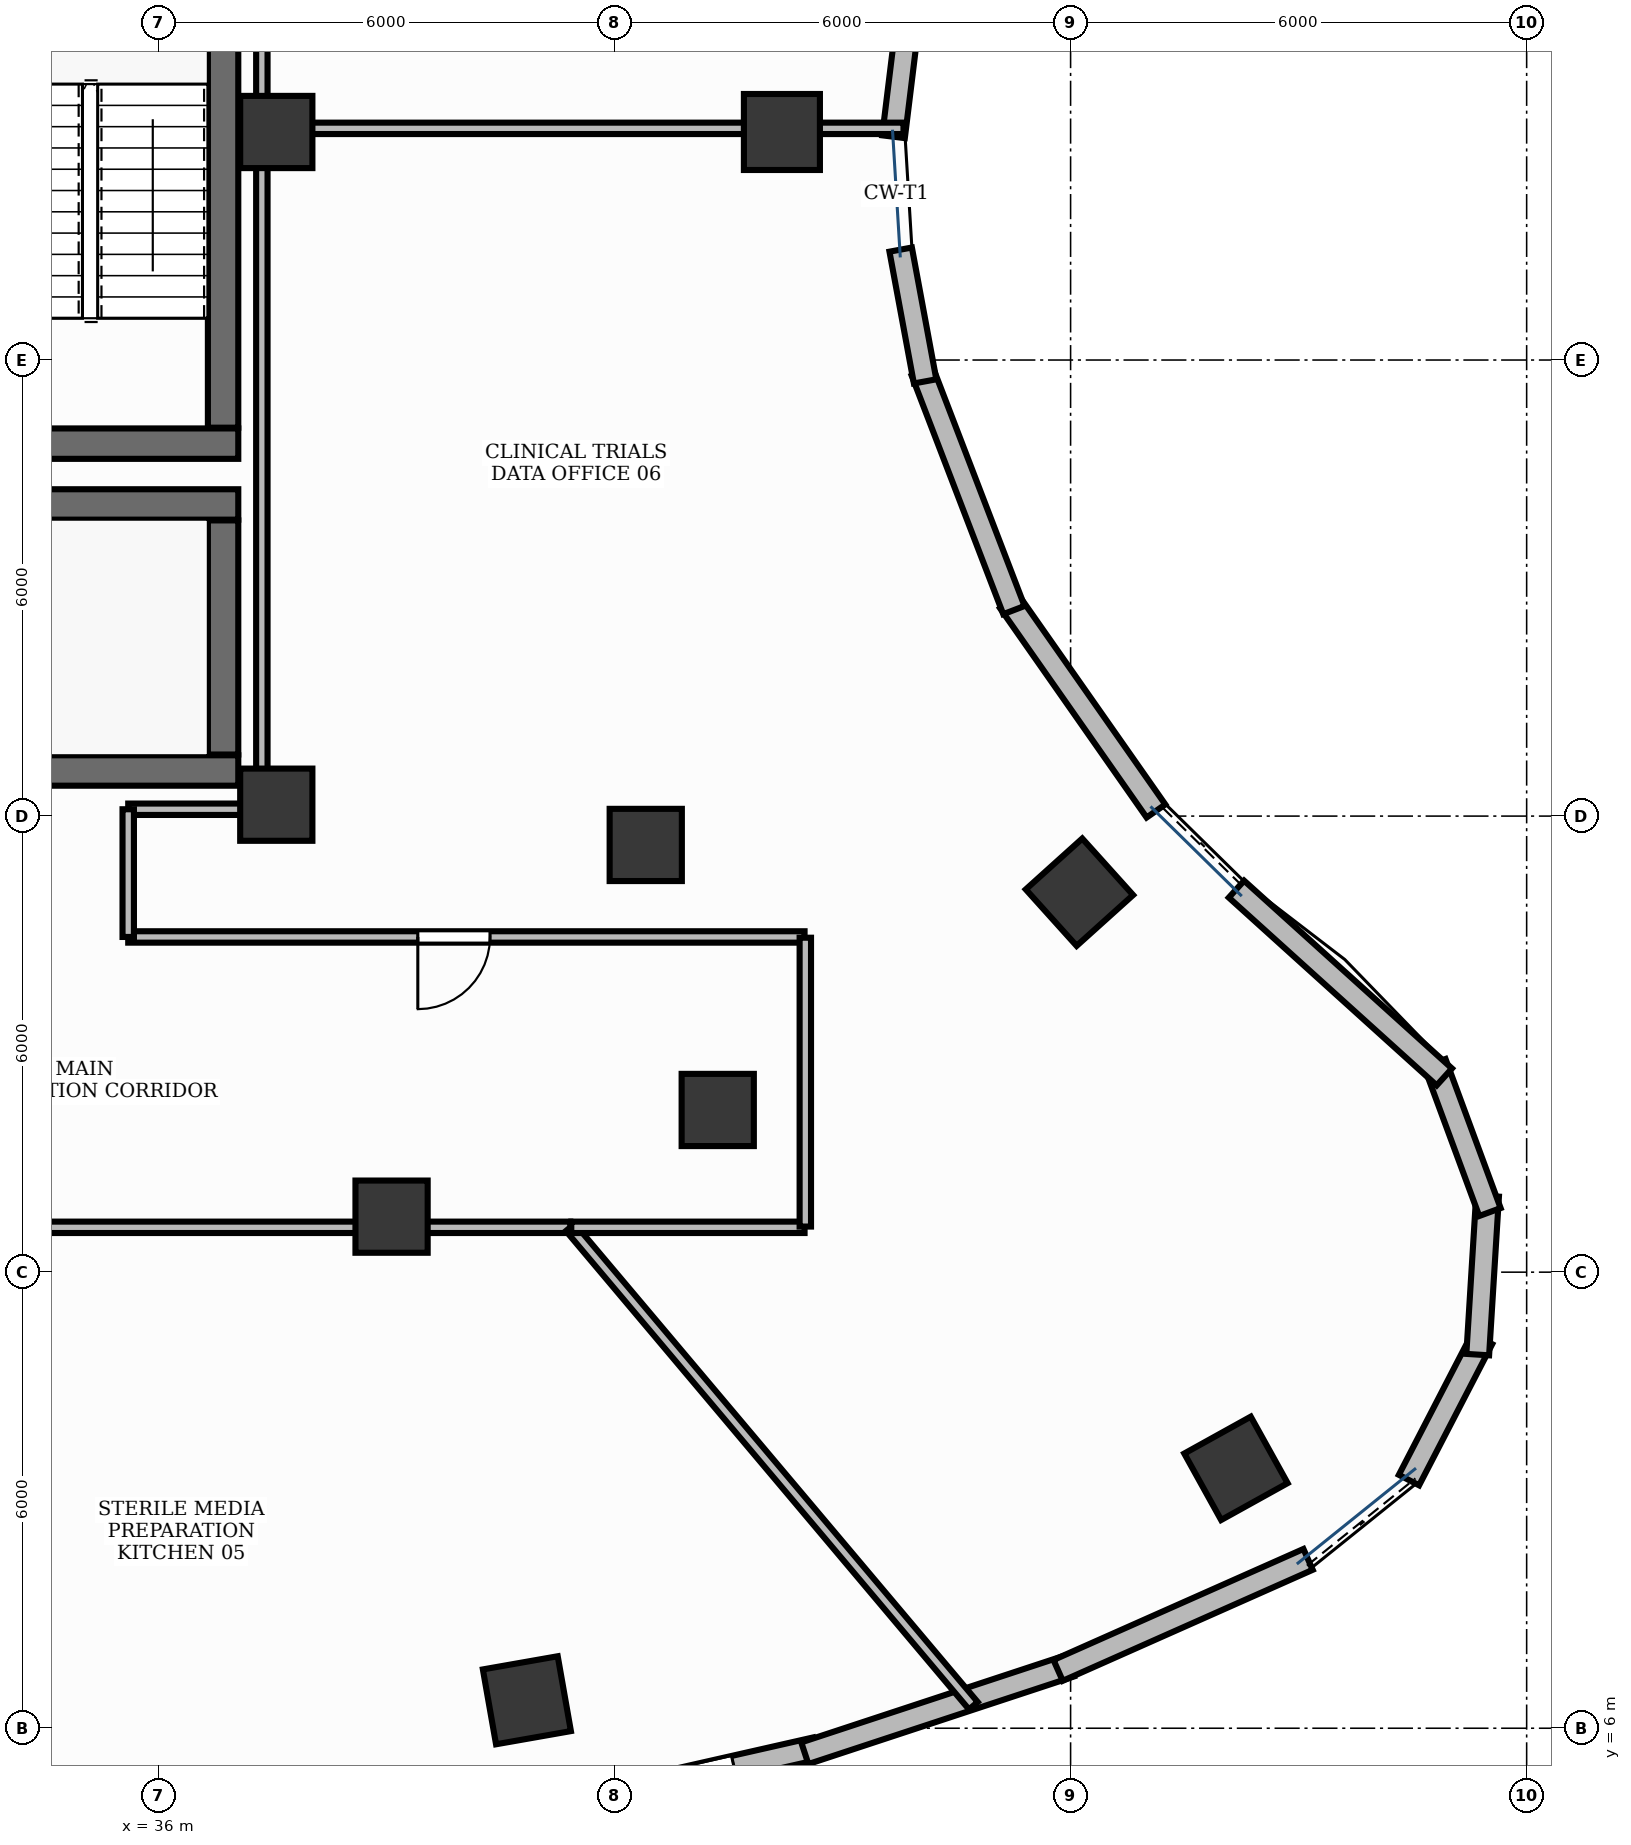
"""IFC4 building model, lengths in metres.
Left out: names, types, materials, properties, quantities, classifications, styles, units other than length and angle.
Written with IfcOpenShell. Run it as: python <this file> out.ifc"""

import sys

from ifc_helpers import new_model, si_unit, direction, frame, frame_2d, origin, origin_2d, place, context, subcontext, project, spatial, rectangle, extrude, element, fill, save


model = new_model("IFC4")
c1 = context("Model", 3, precision=1e-05, world=origin(), true_north=direction((0.0, 1.0)))
c2 = subcontext(c1, "Body", "Model", "MODEL_VIEW")
j1 = project(units=[si_unit("LENGTHUNIT", "METRE"), si_unit("PLANEANGLEUNIT", "RADIAN")], contexts=[c1])
p1 = place(None, origin())
s1 = spatial("IfcSite", under=j1, at=p1, CompositionType="ELEMENT")
p2 = place(p1, origin())
s2 = spatial("IfcBuilding", under=s1, at=p2, CompositionType="ELEMENT")
p3 = place(p2, frame((0.0, 0.0, 218.4)))
s3 = spatial("IfcBuildingStorey", under=s2, at=p3, CompositionType="ELEMENT", Elevation=218.4)
p4 = place(p3, frame((28.852, 18.6, 0.0), z_axis=(0.0, 0.0, 1.0), x_axis=(1.0, 0.0, 0.0)))
e1 = element("IfcWall", 1, at=p4, inside=s3, PredefinedType="SHEAR", context=c2, shape_type="SweptSolid", body=[
    extrude(rectangle(XDim=8.198, YDim=0.4, at=frame_2d((4.099, 0.0))), origin(), (0.0, 0.0, 1.0), 3.9),
])
p5 = place(p3, frame((28.4, 22.1, 0.0), z_axis=(0.0, 0.0, 1.0), x_axis=(1.0, 0.0, 0.0)))
e2 = element("IfcWall", 2, at=p5, inside=s3, PredefinedType="SHEAR", context=c2, shape_type="SweptSolid", body=[
    extrude(rectangle(XDim=8.65, YDim=0.4, at=frame_2d((4.325, 0.0))), origin(), (0.0, 0.0, 1.0), 3.9),
])
p6 = place(p3, frame((36.85, 18.81, 0.0), z_axis=(0.0, 0.0, 1.0), x_axis=(0.0, 1.0, 0.0)))
e3 = element("IfcWall", 3, at=p6, inside=s3, PredefinedType="SHEAR", context=c2, shape_type="SweptSolid", body=[
    extrude(rectangle(XDim=3.08, YDim=0.4, at=frame_2d((1.54, 0.0))), origin(), (0.0, 0.0, 1.0), 3.9),
])
p7 = place(p3, frame((33.15, 22.9, 0.0), z_axis=(0.0, 0.0, 1.0), x_axis=(1.0, 0.0, 0.0)))
e4 = element("IfcWall", 4, at=p7, inside=s3, PredefinedType="SHEAR", context=c2, shape_type="SweptSolid", body=[
    extrude(rectangle(XDim=3.9, YDim=0.4, at=frame_2d((1.95, 0.0))), origin(), (0.0, 0.0, 1.0), 3.9),
])
p8 = place(p3, frame((36.85, 23.11, 0.0), z_axis=(0.0, 0.0, 1.0), x_axis=(0.0, 1.0, 0.0)))
e5 = element("IfcWall", 5, at=p8, inside=s3, PredefinedType="SHEAR", context=c2, shape_type="SweptSolid", body=[
    extrude(rectangle(XDim=7.78, YDim=0.4, at=frame_2d((3.89, 0.0))), origin(), (0.0, 0.0, 1.0), 3.9),
])
for number, where, z_axis, x_axis in (
    (6, (37.55, 18.15, -0.0), (0.0, 0.0, 1.0), (1.0, 0.0, 0.0)),
    (7, (37.55, 27.0, -0.0), (0.0, 0.0, 1.0), (1.0, 0.0, 0.0)),
):
    element("IfcColumn", number, at=place(p3, frame(where, z_axis=z_axis, x_axis=x_axis)), inside=s3, PredefinedType="PILASTER", context=c2, shape_type="SweptSolid", body=[
        extrude(rectangle(XDim=0.95, YDim=0.95, at=origin_2d()), origin(), (0.0, 0.0, 1.0), 3.901),
    ])
p9 = place(p3, frame((40.847, 6.368, -0.0), z_axis=(0.0, 0.0, 1.0), x_axis=(0.984868307662, 0.173304404339, 0.0)))
e8 = element("IfcColumn", 8, at=p9, inside=s3, PredefinedType="COLUMN", context=c2, shape_type="SweptSolid", body=[
    extrude(rectangle(XDim=1.0, YDim=1.0, at=origin_2d()), origin(), (0.0, 0.0, 1.0), 3.901),
])
p10 = place(p3, frame((39.067, 12.73, -0.0), z_axis=(0.0, 0.0, 1.0), x_axis=(1.0, 0.0, 0.0)))
e9 = element("IfcColumn", 9, at=p10, inside=s3, PredefinedType="COLUMN", context=c2, shape_type="SweptSolid", body=[
    extrude(rectangle(XDim=0.95, YDim=0.95, at=origin_2d()), origin(), (0.0, 0.0, 1.0), 3.901),
])
p11 = place(p3, frame((50.176, 9.419, -0.0), z_axis=(0.0, 0.0, 1.0), x_axis=(0.874535078577, 0.484962262797, 0.0)))
e10 = element("IfcColumn", 10, at=p11, inside=s3, PredefinedType="COLUMN", context=c2, shape_type="SweptSolid", body=[
    extrude(rectangle(XDim=1.0, YDim=1.0, at=origin_2d()), origin(), (0.0, 0.0, 1.0), 3.901),
])
p12 = place(p3, frame((43.358, 14.134, -0.0), z_axis=(0.0, 0.0, 1.0), x_axis=(1.0, 0.0, 0.0)))
e11 = element("IfcColumn", 11, at=p12, inside=s3, PredefinedType="COLUMN", context=c2, shape_type="SweptSolid", body=[
    extrude(rectangle(XDim=0.95, YDim=0.95, at=origin_2d()), origin(), (0.0, 0.0, 1.0), 3.901),
])
p13 = place(p3, frame((48.116, 16.999, -0.0), z_axis=(0.0, 0.0, 1.0), x_axis=(-0.669130606359, 0.743144825477, 0.0)))
e12 = element("IfcColumn", 12, at=p13, inside=s3, PredefinedType="COLUMN", context=c2, shape_type="SweptSolid", body=[
    extrude(rectangle(XDim=1.0, YDim=1.0, at=origin_2d()), origin(), (0.0, 0.0, 1.0), 3.901),
])
p14 = place(p3, frame((42.411, 17.62, -0.0), z_axis=(0.0, 0.0, 1.0), x_axis=(1.0, 0.0, 0.0)))
e13 = element("IfcColumn", 13, at=p14, inside=s3, PredefinedType="COLUMN", context=c2, shape_type="SweptSolid", body=[
    extrude(rectangle(XDim=0.95, YDim=0.95, at=origin_2d()), origin(), (0.0, 0.0, 1.0), 3.901),
])
p15 = place(p3, frame((44.202, 27.0, -0.0), z_axis=(0.0, 0.0, 1.0), x_axis=(0.0, 1.0, 0.0)))
e14 = element("IfcColumn", 14, at=p15, inside=s3, PredefinedType="COLUMN", context=c2, shape_type="SweptSolid", body=[
    extrude(rectangle(XDim=1.0, YDim=1.0, at=origin_2d()), origin(), (0.0, 0.0, 1.0), 3.901),
])
p16 = place(p3, frame((41.036, 4.914, 0.0), z_axis=(0.0, 0.0, 1.0), x_axis=(0.975237678872, 0.221159376263, 0.0)))
e15 = element("IfcWall", 15, at=p16, inside=s3, PredefinedType="STANDARD", context=c2, shape_type="SweptSolid", body=[
    extrude(rectangle(XDim=3.703, YDim=0.3, at=frame_2d((1.851, 0.0))), origin(), (0.0, 0.0, 1.0), 3.9),
])
p17 = place(p16, frame((1.101, 0.0, 0.95)))
e16 = element("IfcOpeningElement", 16, at=p17, cuts=e15, PredefinedType="OPENING", context=c2, shape_type="SweptSolid", body=[
    extrude(rectangle(XDim=1.5, YDim=1.8, at=frame_2d((0.75, 0.9))), frame((0.0, 0.165, 0.0), z_axis=(0.0, -1.0, 0.0), x_axis=(1.0, 0.0, 0.0)), (0.0, 0.0, 1.0), 0.33),
])
p18 = place(p3, frame((44.504, 5.671, 0.0), z_axis=(0.0, 0.0, 1.0), x_axis=(0.94972655205, 0.313080622734, 0.0)))
e17 = element("IfcWall", 17, at=p18, inside=s3, PredefinedType="STANDARD", context=c2, shape_type="SweptSolid", body=[
    extrude(rectangle(XDim=3.679, YDim=0.3, at=frame_2d((1.84, 0.0))), origin(), (0.0, 0.0, 1.0), 3.9),
])
p19 = place(p3, frame((47.836, 6.761, 0.0), z_axis=(0.0, 0.0, 1.0), x_axis=(0.913940198441, 0.405848880341, 0.0)))
e18 = element("IfcWall", 18, at=p19, inside=s3, PredefinedType="STANDARD", context=c2, shape_type="SweptSolid", body=[
    extrude(rectangle(XDim=3.598, YDim=0.3, at=frame_2d((1.799, 0.0))), origin(), (0.0, 0.0, 1.0), 3.9),
])
p20 = place(p3, frame((52.452, 9.265, 0.0), z_axis=(0.0, 0.0, 1.0), x_axis=(0.459683297138, 0.888082916361, 0.0)))
e19 = element("IfcWall", 19, at=p20, inside=s3, PredefinedType="STANDARD", context=c2, shape_type="SweptSolid", body=[
    extrude(rectangle(XDim=2.092, YDim=0.3, at=frame_2d((1.046, 0.0))), origin(), (0.0, 0.0, 1.0), 3.9),
])
for number, where, z_axis, x_axis in (
    (20, (53.356, 10.915, 0.0), (0.0, 0.0, 1.0), (0.062, 0.998, 0.0)),
    (21, (53.517, 12.791, 0.0), (0.0, 0.0, 1.0), (-0.346, 0.938, 0.0)),
):
    element("IfcWall", number, at=place(p3, frame(where, z_axis=z_axis, x_axis=x_axis)), inside=s3, PredefinedType="STANDARD", context=c2, shape_type="SweptSolid", body=[
        extrude(rectangle(XDim=2.091, YDim=0.3, at=frame_2d((1.046, 0.0))), origin(), (0.0, 0.0, 1.0), 3.9),
    ])
p21 = place(p3, frame((52.917, 14.569, 0.0), z_axis=(0.0, 0.0, 1.0), x_axis=(-0.742037796493, 0.670358045059, 0.0)))
e22 = element("IfcWall", 22, at=p21, inside=s3, PredefinedType="STANDARD", context=c2, shape_type="SweptSolid", body=[
    extrude(rectangle(XDim=3.685, YDim=0.3, at=frame_2d((1.843, 0.0))), origin(), (0.0, 0.0, 1.0), 3.9),
])
p22 = place(p3, frame((49.123, 18.067, 0.0), z_axis=(0.0, 0.0, 1.0), x_axis=(-0.573598849051, 0.819136350291, 0.0)))
e23 = element("IfcWall", 23, at=p22, inside=s3, PredefinedType="STANDARD", context=c2, shape_type="SweptSolid", body=[
    extrude(rectangle(XDim=3.361, YDim=0.3, at=frame_2d((1.68, 0.0))), origin(), (0.0, 0.0, 1.0), 3.9),
])
p23 = place(p3, frame((47.254, 20.71, 0.0), z_axis=(0.0, 0.0, 1.0), x_axis=(-0.358365624917, 0.933581318835, 0.0)))
e24 = element("IfcWall", 24, at=p23, inside=s3, PredefinedType="STANDARD", context=c2, shape_type="SweptSolid", body=[
    extrude(rectangle(XDim=3.361, YDim=0.3, at=frame_2d((1.68, 0.0))), origin(), (0.0, 0.0, 1.0), 3.9),
])
p24 = place(p3, frame((46.086, 23.719, 0.0), z_axis=(0.0, 0.0, 1.0), x_axis=(-0.182198328631, 0.983261800867, 0.0)))
e25 = element("IfcWall", 25, at=p24, inside=s3, PredefinedType="STANDARD", context=c2, shape_type="SweptSolid", body=[
    extrude(rectangle(XDim=1.763, YDim=0.3, at=frame_2d((0.882, 0.0))), origin(), (0.0, 0.0, 1.0), 3.9),
])
p25 = place(p3, frame((45.67, 26.938, 0.0), z_axis=(0.0, 0.0, 1.0), x_axis=(0.121834797873, 0.992550392689, 0.0)))
e26 = element("IfcWall", 26, at=p25, inside=s3, PredefinedType="STANDARD", context=c2, shape_type="SweptSolid", body=[
    extrude(rectangle(XDim=3.361, YDim=0.3, at=frame_2d((1.68, 0.0))), origin(), (0.0, 0.0, 1.0), 3.9),
])
p26 = place(p3, frame((29.612, 12.59, 0.0), z_axis=(0.0, 0.0, 1.0), x_axis=(1.0, 0.0, 0.0)))
e27 = element("IfcWall", 27, at=p26, inside=s3, PredefinedType="PARTITIONING", context=c2, shape_type="SweptSolid", body=[
    extrude(rectangle(XDim=11.806, YDim=0.15, at=frame_2d((5.903, 0.0))), origin(), (0.0, 0.0, 1.0), 2.91),
])
p27 = place(p26, frame((0.24, 0.0, 0.0)))
e28 = element("IfcOpeningElement", 28, at=p27, cuts=e27, PredefinedType="OPENING", context=c2, shape_type="SweptSolid", body=[
    extrude(rectangle(XDim=0.95, YDim=2.15, at=frame_2d((0.475, 1.075))), frame((0.0, 0.09, 0.0), z_axis=(0.0, -1.0, 0.0), x_axis=(1.0, 0.0, 0.0)), (0.0, 0.0, 1.0), 0.18),
])
p28 = place(p3, frame((44.5, 16.41, 0.0), z_axis=(0.0, 0.0, 1.0), x_axis=(-1.0, 0.0, 0.0)))
e29 = element("IfcWall", 29, at=p28, inside=s3, PredefinedType="PARTITIONING", context=c2, shape_type="SweptSolid", body=[
    extrude(rectangle(XDim=8.898, YDim=0.15, at=frame_2d((4.449, 0.0))), origin(), (0.0, 0.0, 1.0), 2.91),
])
p29 = place(p28, frame((4.138, 0.0, 0.0)))
e30 = element("IfcOpeningElement", 30, at=p29, cuts=e29, PredefinedType="OPENING", context=c2, shape_type="SweptSolid", body=[
    extrude(rectangle(XDim=0.95, YDim=2.15, at=frame_2d((0.475, 1.075))), frame((0.0, 0.09, 0.0), z_axis=(0.0, -1.0, 0.0), x_axis=(1.0, 0.0, 0.0)), (0.0, 0.0, 1.0), 0.18),
])
p30 = place(p3, frame((41.418, 12.59, 0.0), z_axis=(0.0, 0.0, 1.0), x_axis=(0.644315695233, -0.764759625554, 0.0)))
e31 = element("IfcWall", 31, at=p30, inside=s3, PredefinedType="PARTITIONING", context=c2, shape_type="SweptSolid", body=[
    extrude(rectangle(XDim=8.23, YDim=0.15, at=frame_2d((4.115, 0.0))), origin(), (0.0, 0.0, 1.0), 2.91),
])
p31 = place(p3, frame((35.602, 18.09, 0.0), z_axis=(0.0, 0.0, 1.0), x_axis=(1.0, 0.0, 0.0)))
e32 = element("IfcWall", 32, at=p31, inside=s3, PredefinedType="PARTITIONING", context=c2, shape_type="SweptSolid", body=[
    extrude(rectangle(XDim=1.748, YDim=0.15, at=frame_2d((0.874, 0.0))), origin(), (0.0, 0.0, 1.0), 2.91),
])
p32 = place(p3, frame((37.36, 18.1, 0.0), z_axis=(0.0, 0.0, 1.0), x_axis=(0.0, 1.0, 0.0)))
e33 = element("IfcWall", 33, at=p32, inside=s3, PredefinedType="PARTITIONING", context=c2, shape_type="SweptSolid", body=[
    extrude(rectangle(XDim=8.948, YDim=0.15, at=frame_2d((4.474, 0.0))), origin(), (0.0, 0.0, 1.0), 2.91),
])
p33 = place(p3, frame((37.36, 27.048, 0.0), z_axis=(0.0, 0.0, 1.0), x_axis=(1.0, 0.0, 0.0)))
e34 = element("IfcWall", 34, at=p33, inside=s3, PredefinedType="PARTITIONING", context=c2, shape_type="SweptSolid", body=[
    extrude(rectangle(XDim=8.441, YDim=0.15, at=frame_2d((4.221, 0.0))), origin(), (0.0, 0.0, 1.0), 2.91),
])
p34 = place(p3, frame((41.431, 12.59, 0.0), z_axis=(0.0, 0.0, 1.0), x_axis=(1.0, 0.0, 0.0)))
e35 = element("IfcWall", 35, at=p34, inside=s3, PredefinedType="PARTITIONING", context=c2, shape_type="SweptSolid", body=[
    extrude(rectangle(XDim=3.069, YDim=0.15, at=frame_2d((1.535, 0.0))), origin(), (0.0, 0.0, 1.0), 2.91),
])
p35 = place(p3, frame((44.51, 12.6, 0.0), z_axis=(0.0, 0.0, 1.0), x_axis=(0.0, 1.0, 0.0)))
e36 = element("IfcWall", 36, at=p35, inside=s3, PredefinedType="PARTITIONING", context=c2, shape_type="SweptSolid", body=[
    extrude(rectangle(XDim=3.8, YDim=0.15, at=frame_2d((1.9, 0.0))), origin(), (0.0, 0.0, 1.0), 2.91),
])
p36 = place(p3, frame((35.602, 16.41, 0.0), z_axis=(0.0, 0.0, 1.0), x_axis=(0.0, 1.0, 0.0)))
e37 = element("IfcWall", 37, at=p36, inside=s3, PredefinedType="PARTITIONING", context=c2, shape_type="SweptSolid", body=[
    extrude(rectangle(XDim=1.68, YDim=0.15, at=frame_2d((0.84, 0.0))), origin(), (0.0, 0.0, 1.0), 2.91),
])
p37 = place(p3, frame((37.36, 27.058, 0.0), z_axis=(0.0, 0.0, 1.0), x_axis=(0.0, 1.0, 0.0)))
e38 = element("IfcWall", 38, at=p37, inside=s3, PredefinedType="PARTITIONING", context=c2, shape_type="SweptSolid", body=[
    extrude(rectangle(XDim=8.842, YDim=0.15, at=frame_2d((4.421, 0.0))), origin(), (0.0, 0.0, 1.0), 2.91),
])
p38 = place(p17, origin())
e39 = element("IfcWindow", 39, at=p38, inside=s3, PartitioningType="DOUBLE_PANEL_VERTICAL", PredefinedType="WINDOW", context=c2, shape_type="SweptSolid", body=[
    extrude(rectangle(XDim=1.5, YDim=1.8, at=frame_2d((0.75, 0.9))), frame((0.0, 0.03, 0.0), z_axis=(0.0, -1.0, 0.0), x_axis=(1.0, 0.0, 0.0)), (0.0, 0.0, 1.0), 0.06),
])
fill(e16, e39)
p39 = place(p29, origin())
e40 = element("IfcDoor", 40, at=p39, inside=s3, OperationType="SINGLE_SWING_RIGHT", PredefinedType="DOOR", context=c2, shape_type="SweptSolid", body=[
    extrude(rectangle(XDim=0.95, YDim=2.15, at=frame_2d((0.475, 1.075))), frame((0.0, 0.025, 0.0), z_axis=(0.0, -1.0, 0.0), x_axis=(1.0, 0.0, 0.0)), (0.0, 0.0, 1.0), 0.05),
])
fill(e30, e40)
save(model, sys.argv[1])
